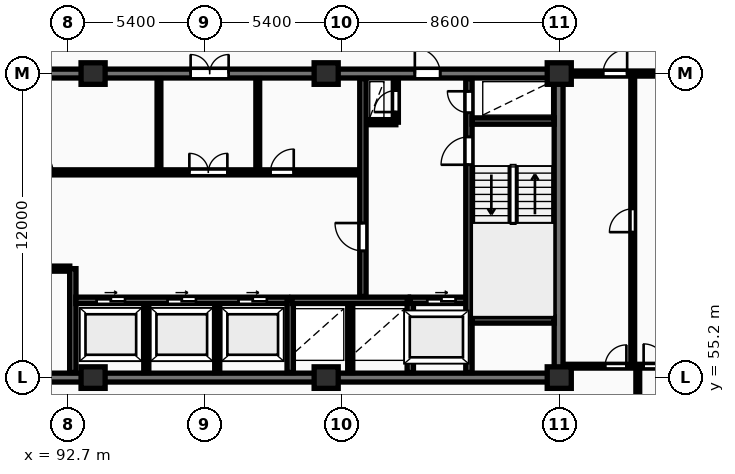
"""IFC4 building model, lengths in metres.
Left out: names, types, materials, properties, quantities, classifications, styles, units other than length and angle.
Written with IfcOpenShell. Run it as: python <this file> out.ifc"""

import sys

from ifc_helpers import new_model, si_unit, direction, frame, frame_2d, origin, origin_2d, place, context, subcontext, project, spatial, rectangle, extrude, element, fill, save


model = new_model("IFC4")
c1 = context("Model", 3, precision=1e-05, world=origin(), true_north=direction((0.0, 1.0)))
c2 = subcontext(c1, "Body", "Model", "MODEL_VIEW")
j1 = project(units=[si_unit("LENGTHUNIT", "METRE"), si_unit("PLANEANGLEUNIT", "RADIAN")], contexts=[c1])
p1 = place(None, origin())
s1 = spatial("IfcSite", under=j1, at=p1, CompositionType="ELEMENT")
p2 = place(p1, origin())
s2 = spatial("IfcBuilding", under=s1, at=p2, CompositionType="ELEMENT")
p3 = place(p2, frame((0.0, 0.0, 106.8)))
s3 = spatial("IfcBuildingStorey", under=s2, at=p3, CompositionType="ELEMENT", Elevation=106.8)
for number, where, z_axis, x_axis in (
    (1, (93.7, 55.2, 0.0), (0.0, 0.0, 1.0), (1.0, 0.0, 0.0)),
    (2, (93.7, 67.2, 0.0), (0.0, 0.0, 1.0), (1.0, 0.0, 0.0)),
    (3, (102.9, 55.2, 0.0), (0.0, 0.0, 1.0), (1.0, 0.0, 0.0)),
    (4, (102.9, 67.2, 0.0), (0.0, 0.0, 1.0), (1.0, 0.0, 0.0)),
    (5, (112.1, 55.2, 0.0), (0.0, 0.0, 1.0), (1.0, 0.0, 0.0)),
    (6, (112.1, 67.2, 0.0), (0.0, 0.0, 1.0), (1.0, 0.0, 0.0)),
):
    element("IfcColumn", number, at=place(p3, frame(where, z_axis=z_axis, x_axis=x_axis)), inside=s3, PredefinedType="COLUMN", context=c2, shape_type="SweptSolid", body=[
        extrude(rectangle(XDim=0.95, YDim=0.85, at=origin_2d()), origin(), (0.0, 0.0, 1.0), 3.25),
    ])
p4 = place(p3, frame((75.95, 55.2, 0.0), z_axis=(0.0, 0.0, 1.0), x_axis=(1.0, 0.0, 0.0)))
e7 = element("IfcWall", 7, at=p4, inside=s3, PredefinedType="SHEAR", context=c2, shape_type="SweptSolid", body=[
    extrude(rectangle(XDim=36.3, YDim=0.35, at=frame_2d((18.15, 0.0))), origin(), (0.0, 0.0, 1.0), 3.25),
])
p5 = place(p3, frame((112.075, 55.375, 0.0), z_axis=(0.0, 0.0, 1.0), x_axis=(0.0, 1.0, 0.0)))
e8 = element("IfcWall", 8, at=p5, inside=s3, PredefinedType="SHEAR", context=c2, shape_type="SweptSolid", body=[
    extrude(rectangle(XDim=11.65, YDim=0.35, at=frame_2d((5.825, 0.0))), origin(), (0.0, 0.0, 1.0), 3.25),
])
p6 = place(p3, frame((75.95, 67.2, 0.0), z_axis=(0.0, 0.0, 1.0), x_axis=(1.0, 0.0, 0.0)))
e9 = element("IfcWall", 9, at=p6, inside=s3, PredefinedType="SHEAR", context=c2, shape_type="SweptSolid", body=[
    extrude(rectangle(XDim=36.3, YDim=0.35, at=frame_2d((18.15, 0.0))), origin(), (0.0, 0.0, 1.0), 3.25),
])
p7 = place(p6, frame((5.25, 0.0, 0.0)))
e10 = element("IfcOpeningElement", 10, at=p7, cuts=e9, PredefinedType="OPENING", context=c2, shape_type="SweptSolid", body=[
    extrude(rectangle(XDim=1.0, YDim=2.15, at=frame_2d((0.5, 1.075))), frame((0.0, 0.185, 0.0), z_axis=(0.0, -1.0, 0.0), x_axis=(1.0, 0.0, 0.0)), (0.0, 0.0, 1.0), 0.37),
])
p8 = place(p6, frame((21.6, 0.0, 0.0)))
e11 = element("IfcOpeningElement", 11, at=p8, cuts=e9, PredefinedType="OPENING", context=c2, shape_type="SweptSolid", body=[
    extrude(rectangle(XDim=1.5, YDim=2.2, at=frame_2d((0.75, 1.1))), frame((0.0, 0.185, 0.0), z_axis=(0.0, -1.0, 0.0), x_axis=(1.0, 0.0, 0.0)), (0.0, 0.0, 1.0), 0.37),
])
p9 = place(p6, frame((30.45, 0.0, 0.0)))
e12 = element("IfcOpeningElement", 12, at=p9, cuts=e9, PredefinedType="OPENING", context=c2, shape_type="SweptSolid", body=[
    extrude(rectangle(XDim=1.0, YDim=2.15, at=frame_2d((0.5, 1.075))), frame((0.0, 0.185, 0.0), z_axis=(0.0, -1.0, 0.0), x_axis=(1.0, 0.0, 0.0)), (0.0, 0.0, 1.0), 0.37),
])
p10 = place(p3, frame((84.42, 59.5, 0.0), z_axis=(0.0, 0.0, 1.0), x_axis=(1.0, 0.0, 0.0)))
e13 = element("IfcWall", 13, at=p10, inside=s3, PredefinedType="PARTITIONING", context=c2, shape_type="SweptSolid", body=[
    extrude(rectangle(XDim=8.36, YDim=0.2, at=frame_2d((4.18, 0.0))), origin(), (0.0, 0.0, 1.0), 2.97),
])
p11 = place(p10, frame((3.4, 0.0, 0.0)))
e14 = element("IfcOpeningElement", 14, at=p11, cuts=e13, PredefinedType="OPENING", context=c2, shape_type="SweptSolid", body=[
    extrude(rectangle(XDim=0.92, YDim=2.08, at=frame_2d((0.46, 1.04))), frame((0.0, 0.11, 0.0), z_axis=(0.0, -1.0, 0.0), x_axis=(1.0, 0.0, 0.0)), (0.0, 0.0, 1.0), 0.22),
])
p12 = place(p3, frame((92.9, 55.4, 0.0), z_axis=(0.0, 0.0, 1.0), x_axis=(0.0, 1.0, 0.0)))
e15 = element("IfcWall", 15, at=p12, inside=s3, PredefinedType="SHEAR", context=c2, shape_type="SweptSolid", body=[
    extrude(rectangle(XDim=4.1, YDim=0.25, at=frame_2d((2.05, 0.0))), origin(), (0.0, 0.0, 1.0), 3.25),
])
for number, where, z_axis, x_axis in (
    (16, (95.8, 55.4, 0.0), (0.0, 0.0, 1.0), (0.0, 1.0, 0.0)),
    (17, (98.6, 55.4, 0.0), (0.0, 0.0, 1.0), (0.0, 1.0, 0.0)),
):
    element("IfcWall", number, at=place(p3, frame(where, z_axis=z_axis, x_axis=x_axis)), inside=s3, PredefinedType="PARTITIONING", context=c2, shape_type="SweptSolid", body=[
        extrude(rectangle(XDim=2.72, YDim=0.2, at=frame_2d((1.36, 0.0))), origin(), (0.0, 0.0, 1.0), 2.97),
    ])
p13 = place(p3, frame((93.02, 58.25, 0.0), z_axis=(0.0, 0.0, 1.0), x_axis=(1.0, 0.0, 0.0)))
e18 = element("IfcWall", 18, at=p13, inside=s3, PredefinedType="SHEAR", context=c2, shape_type="SweptSolid", body=[
    extrude(rectangle(XDim=8.36, YDim=0.25, at=frame_2d((4.18, 0.0))), origin(), (0.0, 0.0, 1.0), 3.25),
])
p14 = place(p13, frame((0.82, 0.0, 0.0)))
e19 = element("IfcOpeningElement", 19, at=p14, cuts=e18, PredefinedType="OPENING", context=c2, shape_type="SweptSolid", body=[
    extrude(rectangle(XDim=1.12, YDim=2.12, at=frame_2d((0.56, 1.06))), frame((0.0, 0.135, 0.0), z_axis=(0.0, -1.0, 0.0), x_axis=(1.0, 0.0, 0.0)), (0.0, 0.0, 1.0), 0.27),
])
p15 = place(p13, frame((3.62, 0.0, 0.0)))
e20 = element("IfcOpeningElement", 20, at=p15, cuts=e18, PredefinedType="OPENING", context=c2, shape_type="SweptSolid", body=[
    extrude(rectangle(XDim=1.12, YDim=2.12, at=frame_2d((0.56, 1.06))), frame((0.0, 0.135, 0.0), z_axis=(0.0, -1.0, 0.0), x_axis=(1.0, 0.0, 0.0)), (0.0, 0.0, 1.0), 0.27),
])
p16 = place(p13, frame((6.42, 0.0, 0.0)))
e21 = element("IfcOpeningElement", 21, at=p16, cuts=e18, PredefinedType="OPENING", context=c2, shape_type="SweptSolid", body=[
    extrude(rectangle(XDim=1.12, YDim=2.12, at=frame_2d((0.56, 1.06))), frame((0.0, 0.135, 0.0), z_axis=(0.0, -1.0, 0.0), x_axis=(1.0, 0.0, 0.0)), (0.0, 0.0, 1.0), 0.27),
])
p17 = place(p3, frame((101.48, 55.4, 0.0), z_axis=(0.0, 0.0, 1.0), x_axis=(0.0, 1.0, 0.0)))
e22 = element("IfcWall", 22, at=p17, inside=s3, PredefinedType="SHEAR", context=c2, shape_type="SweptSolid", body=[
    extrude(rectangle(XDim=2.85, YDim=0.25, at=frame_2d((1.425, 0.0))), origin(), (0.0, 0.0, 1.0), 3.25),
])
p18 = place(p3, frame((103.85, 55.4, 0.0), z_axis=(0.0, 0.0, 1.0), x_axis=(0.0, 1.0, 0.0)))
e23 = element("IfcWall", 23, at=p18, inside=s3, PredefinedType="PARTITIONING", context=c2, shape_type="SweptSolid", body=[
    extrude(rectangle(XDim=2.72, YDim=0.2, at=frame_2d((1.36, 0.0))), origin(), (0.0, 0.0, 1.0), 2.97),
])
p19 = place(p3, frame((101.55, 58.25, 0.0), z_axis=(0.0, 0.0, 1.0), x_axis=(1.0, 0.0, 0.0)))
e24 = element("IfcWall", 24, at=p19, inside=s3, PredefinedType="SHEAR", context=c2, shape_type="SweptSolid", body=[
    extrude(rectangle(XDim=4.6, YDim=0.25, at=frame_2d((2.3, 0.0))), origin(), (0.0, 0.0, 1.0), 3.25),
])
p20 = place(p3, frame((106.22, 55.4, 0.0), z_axis=(0.0, 0.0, 1.0), x_axis=(0.0, 1.0, 0.0)))
e25 = element("IfcWall", 25, at=p20, inside=s3, PredefinedType="SHEAR", context=c2, shape_type="SweptSolid", body=[
    extrude(rectangle(XDim=2.85, YDim=0.25, at=frame_2d((1.425, 0.0))), origin(), (0.0, 0.0, 1.0), 3.25),
])
p21 = place(p3, frame((106.22, 58.25, 0.0), z_axis=(0.0, 0.0, 1.0), x_axis=(1.0, 0.0, 0.0)))
e26 = element("IfcWall", 26, at=p21, inside=s3, PredefinedType="SHEAR", context=c2, shape_type="SweptSolid", body=[
    extrude(rectangle(XDim=2.46, YDim=0.25, at=frame_2d((1.23, 0.0))), origin(), (0.0, 0.0, 1.0), 3.25),
])
p22 = place(p21, frame((0.67, 0.0, 0.0)))
e27 = element("IfcOpeningElement", 27, at=p22, cuts=e26, PredefinedType="OPENING", context=c2, shape_type="SweptSolid", body=[
    extrude(rectangle(XDim=1.12, YDim=2.12, at=frame_2d((0.56, 1.06))), frame((0.0, 0.135, 0.0), z_axis=(0.0, -1.0, 0.0), x_axis=(1.0, 0.0, 0.0)), (0.0, 0.0, 1.0), 0.27),
])
for number, where, z_axis, x_axis in (
    (28, (96.3, 63.4, 0.0), (0.0, 0.0, 1.0), (0.0, 1.0, 0.0)),
    (29, (100.2, 63.4, 0.0), (0.0, 0.0, 1.0), (0.0, 1.0, 0.0)),
):
    element("IfcWall", number, at=place(p3, frame(where, z_axis=z_axis, x_axis=x_axis)), inside=s3, PredefinedType="PARTITIONING", context=c2, shape_type="SweptSolid", body=[
        extrude(rectangle(XDim=3.6, YDim=0.15, at=frame_2d((1.8, 0.0))), origin(), (0.0, 0.0, 1.0), 2.97),
    ])
p23 = place(p3, frame((84.42, 63.3, 0.0), z_axis=(0.0, 0.0, 1.0), x_axis=(1.0, 0.0, 0.0)))
e30 = element("IfcWall", 30, at=p23, inside=s3, PredefinedType="PARTITIONING", context=c2, shape_type="SweptSolid", body=[
    extrude(rectangle(XDim=19.83, YDim=0.2, at=frame_2d((9.915, 0.0))), origin(), (0.0, 0.0, 1.0), 2.97),
])
p24 = place(p23, frame((1.15, 0.0, 0.0)))
e31 = element("IfcOpeningElement", 31, at=p24, cuts=e30, PredefinedType="OPENING", context=c2, shape_type="SweptSolid", body=[
    extrude(rectangle(XDim=0.85, YDim=2.05, at=frame_2d((0.425, 1.025))), frame((0.0, 0.11, 0.0), z_axis=(0.0, -1.0, 0.0), x_axis=(1.0, 0.0, 0.0)), (0.0, 0.0, 1.0), 0.22),
])
p25 = place(p23, frame((3.25, 0.0, 0.0)))
e32 = element("IfcOpeningElement", 32, at=p25, cuts=e30, PredefinedType="OPENING", context=c2, shape_type="SweptSolid", body=[
    extrude(rectangle(XDim=0.85, YDim=2.05, at=frame_2d((0.425, 1.025))), frame((0.0, 0.11, 0.0), z_axis=(0.0, -1.0, 0.0), x_axis=(1.0, 0.0, 0.0)), (0.0, 0.0, 1.0), 0.22),
])
p26 = place(p23, frame((13.08, 0.0, 0.0)))
e33 = element("IfcOpeningElement", 33, at=p26, cuts=e30, PredefinedType="OPENING", context=c2, shape_type="SweptSolid", body=[
    extrude(rectangle(XDim=1.5, YDim=2.2, at=frame_2d((0.75, 1.1))), frame((0.0, 0.11, 0.0), z_axis=(0.0, -1.0, 0.0), x_axis=(1.0, 0.0, 0.0)), (0.0, 0.0, 1.0), 0.22),
])
p27 = place(p23, frame((6.78, 0.0, 0.0)))
e34 = element("IfcOpeningElement", 34, at=p27, cuts=e30, PredefinedType="OPENING", context=c2, shape_type="SweptSolid", body=[
    extrude(rectangle(XDim=0.92, YDim=2.08, at=frame_2d((0.46, 1.04))), frame((0.0, 0.11, 0.0), z_axis=(0.0, -1.0, 0.0), x_axis=(1.0, 0.0, 0.0)), (0.0, 0.0, 1.0), 0.22),
])
p28 = place(p23, frame((16.28, 0.0, 0.0)))
e35 = element("IfcOpeningElement", 35, at=p28, cuts=e30, PredefinedType="OPENING", context=c2, shape_type="SweptSolid", body=[
    extrude(rectangle(XDim=0.92, YDim=2.08, at=frame_2d((0.46, 1.04))), frame((0.0, 0.11, 0.0), z_axis=(0.0, -1.0, 0.0), x_axis=(1.0, 0.0, 0.0)), (0.0, 0.0, 1.0), 0.22),
])
p29 = place(p3, frame((104.45, 65.28, 0.0), z_axis=(0.0, 0.0, 1.0), x_axis=(1.0, 0.0, 0.0)))
e36 = element("IfcWall", 36, at=p29, inside=s3, PredefinedType="PARTITIONING", context=c2, shape_type="SweptSolid", body=[
    extrude(rectangle(XDim=1.2, YDim=0.2, at=frame_2d((0.6, 0.0))), origin(), (0.0, 0.0, 1.0), 2.97),
])
p30 = place(p3, frame((105.65, 65.28, 0.0), z_axis=(0.0, 0.0, 1.0), x_axis=(0.0, 1.0, 0.0)))
e37 = element("IfcWall", 37, at=p30, inside=s3, PredefinedType="PARTITIONING", context=c2, shape_type="SweptSolid", body=[
    extrude(rectangle(XDim=1.72, YDim=0.2, at=frame_2d((0.86, 0.0))), origin(), (0.0, 0.0, 1.0), 2.97),
])
p31 = place(p30, frame((0.4, 0.0, 0.0)))
e38 = element("IfcOpeningElement", 38, at=p31, cuts=e37, PredefinedType="OPENING", context=c2, shape_type="SweptSolid", body=[
    extrude(rectangle(XDim=0.85, YDim=2.05, at=frame_2d((0.425, 1.025))), frame((0.0, 0.11, 0.0), z_axis=(0.0, -1.0, 0.0), x_axis=(1.0, 0.0, 0.0)), (0.0, 0.0, 1.0), 0.22),
])
p32 = place(p3, frame((104.35, 58.4, 0.0), z_axis=(0.0, 0.0, 1.0), x_axis=(0.0, 1.0, 0.0)))
e39 = element("IfcWall", 39, at=p32, inside=s3, PredefinedType="SHEAR", context=c2, shape_type="SweptSolid", body=[
    extrude(rectangle(XDim=8.6, YDim=0.25, at=frame_2d((4.3, 0.0))), origin(), (0.0, 0.0, 1.0), 3.25),
])
p33 = place(p32, frame((1.8, 0.0, 0.0)))
e40 = element("IfcOpeningElement", 40, at=p33, cuts=e39, PredefinedType="OPENING", context=c2, shape_type="SweptSolid", body=[
    extrude(rectangle(XDim=1.1, YDim=2.1, at=frame_2d((0.55, 1.05))), frame((0.0, 0.135, 0.0), z_axis=(0.0, -1.0, 0.0), x_axis=(1.0, 0.0, 0.0)), (0.0, 0.0, 1.0), 0.27),
])
p34 = place(p3, frame((108.535, 55.4, 0.0), z_axis=(0.0, 0.0, 1.0), x_axis=(0.0, 1.0, 0.0)))
e41 = element("IfcWall", 41, at=p34, inside=s3, PredefinedType="SHEAR", context=c2, shape_type="SweptSolid", body=[
    extrude(rectangle(XDim=11.6, YDim=0.25, at=frame_2d((5.8, 0.0))), origin(), (0.0, 0.0, 1.0), 3.25),
])
p35 = place(p34, frame((8.2, 0.0, 0.0)))
e42 = element("IfcOpeningElement", 42, at=p35, cuts=e41, PredefinedType="OPENING", context=c2, shape_type="SweptSolid", body=[
    extrude(rectangle(XDim=1.1, YDim=2.1, at=frame_2d((0.55, 1.05))), frame((0.0, 0.135, 0.0), z_axis=(0.0, -1.0, 0.0), x_axis=(1.0, 0.0, 0.0)), (0.0, 0.0, 1.0), 0.27),
])
p36 = place(p34, frame((10.25, 0.0, 0.0)))
e43 = element("IfcOpeningElement", 43, at=p36, cuts=e41, PredefinedType="OPENING", context=c2, shape_type="SweptSolid", body=[
    extrude(rectangle(XDim=0.85, YDim=2.05, at=frame_2d((0.425, 1.025))), frame((0.0, 0.135, 0.0), z_axis=(0.0, -1.0, 0.0), x_axis=(1.0, 0.0, 0.0)), (0.0, 0.0, 1.0), 0.27),
])
for number, where, z_axis, x_axis in (
    (44, (108.66, 57.475, 0.0), (0.0, 0.0, 1.0), (1.0, 0.0, 0.0)),
    (45, (108.66, 65.325, 0.0), (0.0, 0.0, 1.0), (1.0, 0.0, 0.0)),
):
    element("IfcWall", number, at=place(p3, frame(where, z_axis=z_axis, x_axis=x_axis)), inside=s3, PredefinedType="SHEAR", context=c2, shape_type="SweptSolid", body=[
        extrude(rectangle(XDim=3.24, YDim=0.25, at=frame_2d((1.62, 0.0))), origin(), (0.0, 0.0, 1.0), 3.25),
    ])
p37 = place(p3, frame((115.0, 55.65, 0.0), z_axis=(0.0, 0.0, 1.0), x_axis=(0.0, 1.0, 0.0)))
e46 = element("IfcWall", 46, at=p37, inside=s3, PredefinedType="PARTITIONING", context=c2, shape_type="SweptSolid", body=[
    extrude(rectangle(XDim=11.5, YDim=0.15, at=frame_2d((5.75, 0.0))), origin(), (0.0, 0.0, 1.0), 2.97),
])
p38 = place(p37, frame((5.29, 0.0, 0.0)))
e47 = element("IfcOpeningElement", 47, at=p38, cuts=e46, PredefinedType="OPENING", context=c2, shape_type="SweptSolid", body=[
    extrude(rectangle(XDim=0.92, YDim=2.08, at=frame_2d((0.46, 1.04))), frame((0.0, 0.085, 0.0), z_axis=(0.0, -1.0, 0.0), x_axis=(1.0, 0.0, 0.0)), (0.0, 0.0, 1.0), 0.17),
])
p39 = place(p3, frame((115.2, 51.1, 0.0), z_axis=(0.0, 0.0, 1.0), x_axis=(0.0, 1.0, 0.0)))
e48 = element("IfcWall", 48, at=p39, inside=s3, PredefinedType="PARTITIONING", context=c2, shape_type="SweptSolid", body=[
    extrude(rectangle(XDim=4.55, YDim=0.15, at=frame_2d((2.275, 0.0))), origin(), (0.0, 0.0, 1.0), 2.97),
])
p40 = place(p3, frame((112.27, 55.65, 0.0), z_axis=(0.0, 0.0, 1.0), x_axis=(1.0, 0.0, 0.0)))
e49 = element("IfcWall", 49, at=p40, inside=s3, PredefinedType="PARTITIONING", context=c2, shape_type="SweptSolid", body=[
    extrude(rectangle(XDim=6.76, YDim=0.15, at=frame_2d((3.38, 0.0))), origin(), (0.0, 0.0, 1.0), 2.97),
])
p41 = place(p40, frame((1.64, 0.0, 0.0)))
e50 = element("IfcOpeningElement", 50, at=p41, cuts=e49, PredefinedType="OPENING", context=c2, shape_type="SweptSolid", body=[
    extrude(rectangle(XDim=0.84, YDim=2.04, at=frame_2d((0.42, 1.02))), frame((0.0, 0.085, 0.0), z_axis=(0.0, -1.0, 0.0), x_axis=(1.0, 0.0, 0.0)), (0.0, 0.0, 1.0), 0.17),
])
p42 = place(p40, frame((3.16, 0.0, 0.0)))
e51 = element("IfcOpeningElement", 51, at=p42, cuts=e49, PredefinedType="OPENING", context=c2, shape_type="SweptSolid", body=[
    extrude(rectangle(XDim=0.88, YDim=2.06, at=frame_2d((0.44, 1.03))), frame((0.0, 0.085, 0.0), z_axis=(0.0, -1.0, 0.0), x_axis=(1.0, 0.0, 0.0)), (0.0, 0.0, 1.0), 0.17),
])
p43 = place(p3, frame((112.25, 67.2, 0.0), z_axis=(0.0, 0.0, 1.0), x_axis=(1.0, 0.0, 0.0)))
e52 = element("IfcWall", 52, at=p43, inside=s3, PredefinedType="PARTITIONING", context=c2, shape_type="SweptSolid", body=[
    extrude(rectangle(XDim=18.35, YDim=0.2, at=frame_2d((9.175, 0.0))), origin(), (0.0, 0.0, 1.0), 2.433),
])
p44 = place(p43, frame((1.58, 0.0, 0.0)))
e53 = element("IfcOpeningElement", 53, at=p44, cuts=e52, PredefinedType="OPENING", context=c2, shape_type="SweptSolid", body=[
    extrude(rectangle(XDim=0.95, YDim=2.15, at=frame_2d((0.475, 1.075))), frame((0.0, 0.11, 0.0), z_axis=(0.0, -1.0, 0.0), x_axis=(1.0, 0.0, 0.0)), (0.0, 0.0, 1.0), 0.22),
])
p45 = place(p8, origin())
e54 = element("IfcDoor", 54, at=p45, inside=s3, OperationType="DOUBLE_DOOR_SINGLE_SWING", PredefinedType="DOOR", context=c2, shape_type="SweptSolid", body=[
    extrude(rectangle(XDim=1.5, YDim=2.2, at=frame_2d((0.75, 1.1))), frame((0.0, 0.025, 0.0), z_axis=(0.0, -1.0, 0.0), x_axis=(1.0, 0.0, 0.0)), (0.0, 0.0, 1.0), 0.05),
])
fill(e11, e54)
p46 = place(p9, origin())
e55 = element("IfcDoor", 55, at=p46, inside=s3, OperationType="SINGLE_SWING_LEFT", PredefinedType="DOOR", context=c2, shape_type="SweptSolid", body=[
    extrude(rectangle(XDim=1.0, YDim=2.15, at=frame_2d((0.5, 1.075))), frame((0.0, 0.025, 0.0), z_axis=(0.0, -1.0, 0.0), x_axis=(1.0, 0.0, 0.0)), (0.0, 0.0, 1.0), 0.05),
])
fill(e12, e55)
p47 = place(p14, origin())
e56 = element("IfcDoor", 56, at=p47, inside=s3, OperationType="SLIDING_TO_RIGHT", PredefinedType="DOOR", context=c2, shape_type="SweptSolid", body=[
    extrude(rectangle(XDim=1.12, YDim=2.12, at=frame_2d((0.56, 1.06))), frame((0.0, 0.025, 0.0), z_axis=(0.0, -1.0, 0.0), x_axis=(1.0, 0.0, 0.0)), (0.0, 0.0, 1.0), 0.05),
])
fill(e19, e56)
p48 = place(p15, origin())
e57 = element("IfcDoor", 57, at=p48, inside=s3, OperationType="SLIDING_TO_RIGHT", PredefinedType="DOOR", context=c2, shape_type="SweptSolid", body=[
    extrude(rectangle(XDim=1.12, YDim=2.12, at=frame_2d((0.56, 1.06))), frame((0.0, 0.025, 0.0), z_axis=(0.0, -1.0, 0.0), x_axis=(1.0, 0.0, 0.0)), (0.0, 0.0, 1.0), 0.05),
])
fill(e20, e57)
p49 = place(p16, origin())
e58 = element("IfcDoor", 58, at=p49, inside=s3, OperationType="SLIDING_TO_RIGHT", PredefinedType="DOOR", context=c2, shape_type="SweptSolid", body=[
    extrude(rectangle(XDim=1.12, YDim=2.12, at=frame_2d((0.56, 1.06))), frame((0.0, 0.025, 0.0), z_axis=(0.0, -1.0, 0.0), x_axis=(1.0, 0.0, 0.0)), (0.0, 0.0, 1.0), 0.05),
])
fill(e21, e58)
p50 = place(p22, origin())
e59 = element("IfcDoor", 59, at=p50, inside=s3, OperationType="SLIDING_TO_RIGHT", PredefinedType="DOOR", context=c2, shape_type="SweptSolid", body=[
    extrude(rectangle(XDim=1.12, YDim=2.12, at=frame_2d((0.56, 1.06))), frame((0.0, 0.025, 0.0), z_axis=(0.0, -1.0, 0.0), x_axis=(1.0, 0.0, 0.0)), (0.0, 0.0, 1.0), 0.05),
])
fill(e27, e59)
p51 = place(p26, origin())
e60 = element("IfcDoor", 60, at=p51, inside=s3, OperationType="DOUBLE_DOOR_SINGLE_SWING", PredefinedType="DOOR", context=c2, shape_type="SweptSolid", body=[
    extrude(rectangle(XDim=1.5, YDim=2.2, at=frame_2d((0.75, 1.1))), frame((0.0, 0.025, 0.0), z_axis=(0.0, -1.0, 0.0), x_axis=(1.0, 0.0, 0.0)), (0.0, 0.0, 1.0), 0.05),
])
fill(e33, e60)
p52 = place(p27, origin())
e61 = element("IfcDoor", 61, at=p52, inside=s3, OperationType="SINGLE_SWING_LEFT", PredefinedType="DOOR", context=c2, shape_type="SweptSolid", body=[
    extrude(rectangle(XDim=0.92, YDim=2.08, at=frame_2d((0.46, 1.04))), frame((0.0, 0.025, 0.0), z_axis=(0.0, -1.0, 0.0), x_axis=(1.0, 0.0, 0.0)), (0.0, 0.0, 1.0), 0.05),
])
fill(e34, e61)
p53 = place(p28, origin())
e62 = element("IfcDoor", 62, at=p53, inside=s3, OperationType="SINGLE_SWING_RIGHT", PredefinedType="DOOR", context=c2, shape_type="SweptSolid", body=[
    extrude(rectangle(XDim=0.92, YDim=2.08, at=frame_2d((0.46, 1.04))), frame((0.0, 0.025, 0.0), z_axis=(0.0, -1.0, 0.0), x_axis=(1.0, 0.0, 0.0)), (0.0, 0.0, 1.0), 0.05),
])
fill(e35, e62)
p54 = place(p31, origin())
e63 = element("IfcDoor", 63, at=p54, inside=s3, OperationType="SINGLE_SWING_LEFT", PredefinedType="DOOR", context=c2, shape_type="SweptSolid", body=[
    extrude(rectangle(XDim=0.85, YDim=2.05, at=frame_2d((0.425, 1.025))), frame((0.0, 0.025, 0.0), z_axis=(0.0, -1.0, 0.0), x_axis=(1.0, 0.0, 0.0)), (0.0, 0.0, 1.0), 0.05),
])
fill(e38, e63)
p55 = place(p33, origin())
e64 = element("IfcDoor", 64, at=p55, inside=s3, OperationType="SINGLE_SWING_RIGHT", PredefinedType="DOOR", context=c2, shape_type="SweptSolid", body=[
    extrude(rectangle(XDim=1.1, YDim=2.1, at=frame_2d((0.55, 1.05))), frame((0.0, 0.025, 0.0), z_axis=(0.0, -1.0, 0.0), x_axis=(1.0, 0.0, 0.0)), (0.0, 0.0, 1.0), 0.05),
])
fill(e40, e64)
p56 = place(p35, origin())
e65 = element("IfcDoor", 65, at=p56, inside=s3, OperationType="SINGLE_SWING_LEFT", PredefinedType="DOOR", context=c2, shape_type="SweptSolid", body=[
    extrude(rectangle(XDim=1.1, YDim=2.1, at=frame_2d((0.55, 1.05))), frame((0.0, 0.025, 0.0), z_axis=(0.0, -1.0, 0.0), x_axis=(1.0, 0.0, 0.0)), (0.0, 0.0, 1.0), 0.05),
])
fill(e42, e65)
p57 = place(p36, origin())
e66 = element("IfcDoor", 66, at=p57, inside=s3, OperationType="SINGLE_SWING_RIGHT", PredefinedType="DOOR", context=c2, shape_type="SweptSolid", body=[
    extrude(rectangle(XDim=0.85, YDim=2.05, at=frame_2d((0.425, 1.025))), frame((0.0, 0.025, 0.0), z_axis=(0.0, -1.0, 0.0), x_axis=(1.0, 0.0, 0.0)), (0.0, 0.0, 1.0), 0.05),
])
fill(e43, e66)
p58 = place(p38, origin())
e67 = element("IfcDoor", 67, at=p58, inside=s3, OperationType="SINGLE_SWING_LEFT", PredefinedType="DOOR", context=c2, shape_type="SweptSolid", body=[
    extrude(rectangle(XDim=0.92, YDim=2.08, at=frame_2d((0.46, 1.04))), frame((0.0, 0.025, 0.0), z_axis=(0.0, -1.0, 0.0), x_axis=(1.0, 0.0, 0.0)), (0.0, 0.0, 1.0), 0.05),
])
fill(e47, e67)
p59 = place(p41, origin())
e68 = element("IfcDoor", 68, at=p59, inside=s3, OperationType="SINGLE_SWING_RIGHT", PredefinedType="DOOR", context=c2, shape_type="SweptSolid", body=[
    extrude(rectangle(XDim=0.84, YDim=2.04, at=frame_2d((0.42, 1.02))), frame((0.0, 0.025, 0.0), z_axis=(0.0, -1.0, 0.0), x_axis=(1.0, 0.0, 0.0)), (0.0, 0.0, 1.0), 0.05),
])
fill(e50, e68)
p60 = place(p42, origin())
e69 = element("IfcDoor", 69, at=p60, inside=s3, OperationType="SINGLE_SWING_LEFT", PredefinedType="DOOR", context=c2, shape_type="SweptSolid", body=[
    extrude(rectangle(XDim=0.88, YDim=2.06, at=frame_2d((0.44, 1.03))), frame((0.0, 0.025, 0.0), z_axis=(0.0, -1.0, 0.0), x_axis=(1.0, 0.0, 0.0)), (0.0, 0.0, 1.0), 0.05),
])
fill(e51, e69)
p61 = place(p44, origin())
e70 = element("IfcDoor", 70, at=p61, inside=s3, OperationType="SINGLE_SWING_RIGHT", PredefinedType="DOOR", context=c2, shape_type="SweptSolid", body=[
    extrude(rectangle(XDim=0.95, YDim=2.15, at=frame_2d((0.475, 1.075))), frame((0.0, 0.025, 0.0), z_axis=(0.0, -1.0, 0.0), x_axis=(1.0, 0.0, 0.0)), (0.0, 0.0, 1.0), 0.05),
])
fill(e53, e70)
save(model, sys.argv[1])
